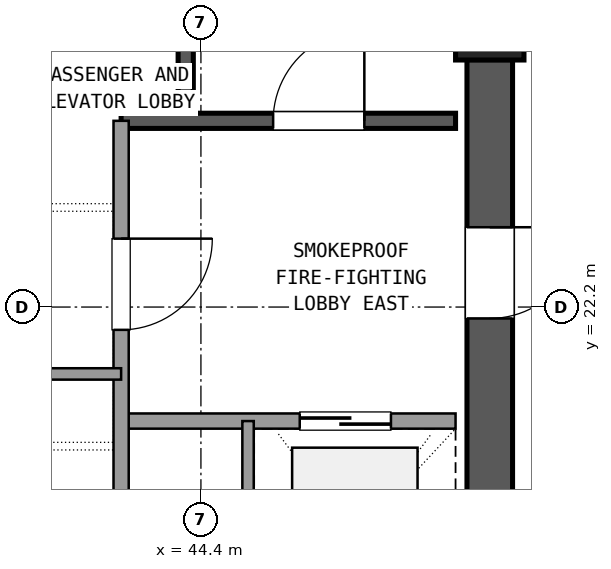
"""IFC4 building model, lengths in metres.
Left out: names, types, materials, properties, quantities, classifications, styles, units other than length and angle.
Written with IfcOpenShell. Run it as: python <this file> out.ifc"""

import sys

from ifc_helpers import new_model, si_unit, direction, frame, frame_2d, origin, origin_2d, place, context, subcontext, project, spatial, rectangle, extrude, element, fill, save


model = new_model("IFC4")
c1 = context("Model", 3, precision=1e-05, world=origin(), true_north=direction((0.0, 1.0)))
c2 = subcontext(c1, "Body", "Model", "MODEL_VIEW")
j1 = project(units=[si_unit("LENGTHUNIT", "METRE"), si_unit("PLANEANGLEUNIT", "RADIAN")], contexts=[c1])
p1 = place(None, origin())
s1 = spatial("IfcSite", under=j1, at=p1, CompositionType="ELEMENT")
p2 = place(p1, origin())
s2 = spatial("IfcBuilding", under=s1, at=p2, CompositionType="ELEMENT")
p3 = place(p2, frame((0.0, 0.0, 221.58)))
s3 = spatial("IfcBuildingStorey", under=s2, at=p3, CompositionType="ELEMENT", Elevation=221.58)
p4 = place(p3, frame((48.2, 25.9, 0.0), z_axis=(0.0, 0.0, 1.0), x_axis=(1.0, 0.0, 0.0)))
e1 = element("IfcColumn", 1, at=p4, inside=s3, PredefinedType="COLUMN", context=c2, shape_type="SweptSolid", body=[
    extrude(rectangle(XDim=0.9, YDim=0.9, at=origin_2d()), origin(), (0.0, 0.0, 1.0), 3.6),
])
p5 = place(p3, frame((48.2, 17.745, 0.0), z_axis=(0.0, 0.0, 1.0), x_axis=(0.0, 1.0, 0.0)))
e2 = element("IfcWall", 2, at=p5, inside=s3, PredefinedType="SHEAR", context=c2, shape_type="SweptSolid", body=[
    extrude(rectangle(XDim=7.71, YDim=0.6, at=frame_2d((3.855, 0.0))), origin(), (0.0, 0.0, 1.0), 3.32),
])
p6 = place(p5, frame((4.305, 0.0, 0.0)))
e3 = element("IfcOpeningElement", 3, at=p6, cuts=e2, PredefinedType="OPENING", context=c2, shape_type="SweptSolid", body=[
    extrude(rectangle(XDim=1.2, YDim=2.15, at=frame_2d((0.6, 1.075))), frame((0.0, 0.31, 0.0), z_axis=(0.0, -1.0, 0.0), x_axis=(1.0, 0.0, 0.0)), (0.0, 0.0, 1.0), 0.62),
])
p7 = place(p3, frame((44.2, 24.65, 0.0), z_axis=(0.0, 0.0, 1.0), x_axis=(0.0, 1.0, 0.0)))
e4 = element("IfcWall", 4, at=p7, inside=s3, PredefinedType="SHEAR", context=c2, shape_type="SweptSolid", body=[
    extrude(rectangle(XDim=9.4, YDim=0.2, at=frame_2d((4.7, 0.0))), origin(), (0.0, 0.0, 1.0), 3.32),
])
p8 = place(p3, frame((43.35, 24.65, 0.0), z_axis=(0.0, 0.0, 1.0), x_axis=(1.0, 0.0, 0.0)))
e5 = element("IfcWall", 5, at=p8, inside=s3, PredefinedType="SHEAR", context=c2, shape_type="SweptSolid", body=[
    extrude(rectangle(XDim=4.4, YDim=0.2, at=frame_2d((2.2, 0.0))), origin(), (0.0, 0.0, 1.0), 3.32),
])
p9 = place(p8, frame((2.0, 0.0, 0.0)))
e6 = element("IfcOpeningElement", 6, at=p9, cuts=e5, PredefinedType="OPENING", context=c2, shape_type="SweptSolid", body=[
    extrude(rectangle(XDim=1.2, YDim=2.15, at=frame_2d((0.6, 1.075))), frame((0.0, 0.11, 0.0), z_axis=(0.0, -1.0, 0.0), x_axis=(1.0, 0.0, 0.0)), (0.0, 0.0, 1.0), 0.22),
])
p10 = place(p3, frame((43.35, 20.7, 0.0), z_axis=(0.0, 0.0, 1.0), x_axis=(1.0, 0.0, 0.0)))
e7 = element("IfcWall", 7, at=p10, inside=s3, PredefinedType="SOLIDWALL", context=c2, shape_type="SweptSolid", body=[
    extrude(rectangle(XDim=4.4, YDim=0.2, at=frame_2d((2.2, 0.0))), origin(), (0.0, 0.0, 1.0), 2.61),
])
p11 = place(p10, frame((2.35, 0.0, 0.0)))
e8 = element("IfcOpeningElement", 8, at=p11, cuts=e7, PredefinedType="OPENING", context=c2, shape_type="SweptSolid", body=[
    extrude(rectangle(XDim=1.2, YDim=2.15, at=frame_2d((0.6, 1.075))), frame((0.0, 0.11, 0.0), z_axis=(0.0, -1.0, 0.0), x_axis=(1.0, 0.0, 0.0)), (0.0, 0.0, 1.0), 0.22),
])
p12 = place(p3, frame((43.35, 17.75, 0.0), z_axis=(0.0, 0.0, 1.0), x_axis=(0.0, 1.0, 0.0)))
e9 = element("IfcWall", 9, at=p12, inside=s3, PredefinedType="SOLIDWALL", context=c2, shape_type="SweptSolid", body=[
    extrude(rectangle(XDim=6.9, YDim=0.2, at=frame_2d((3.45, 0.0))), origin(), (0.0, 0.0, 1.0), 2.61),
])
p13 = place(p12, frame((4.15, 0.0, 0.0)))
e10 = element("IfcOpeningElement", 10, at=p13, cuts=e9, PredefinedType="OPENING", context=c2, shape_type="SweptSolid", body=[
    extrude(rectangle(XDim=1.2, YDim=2.15, at=frame_2d((0.6, 1.075))), frame((0.0, 0.11, 0.0), z_axis=(0.0, -1.0, 0.0), x_axis=(1.0, 0.0, 0.0)), (0.0, 0.0, 1.0), 0.22),
])
p14 = place(p3, frame((45.02, 17.75, 0.0), z_axis=(0.0, 0.0, 1.0), x_axis=(0.0, 1.0, 0.0)))
e11 = element("IfcWall", 11, at=p14, inside=s3, PredefinedType="PARTITIONING", context=c2, shape_type="SweptSolid", body=[
    extrude(rectangle(XDim=2.95, YDim=0.15, at=frame_2d((1.475, 0.0))), origin(), (0.0, 0.0, 1.0), 2.61),
])
p15 = place(p3, frame((37.25, 21.32, 0.0), z_axis=(0.0, 0.0, 1.0), x_axis=(1.0, 0.0, 0.0)))
e12 = element("IfcWall", 12, at=p15, inside=s3, PredefinedType="PARTITIONING", context=c2, shape_type="SweptSolid", body=[
    extrude(rectangle(XDim=6.1, YDim=0.15, at=frame_2d((3.05, 0.0))), origin(), (0.0, 0.0, 1.0), 2.61),
])
p16 = place(p15, frame((0.55, 0.0, 0.0)))
e13 = element("IfcOpeningElement", 13, at=p16, cuts=e12, PredefinedType="OPENING", context=c2, shape_type="SweptSolid", body=[
    extrude(rectangle(XDim=1.0, YDim=2.15, at=frame_2d((0.5, 1.075))), frame((0.0, 0.085, 0.0), z_axis=(0.0, -1.0, 0.0), x_axis=(1.0, 0.0, 0.0)), (0.0, 0.0, 1.0), 0.17),
])
p17 = place(p15, frame((3.15, 0.0, 0.0)))
e14 = element("IfcOpeningElement", 14, at=p17, cuts=e12, PredefinedType="OPENING", context=c2, shape_type="SweptSolid", body=[
    extrude(rectangle(XDim=1.0, YDim=2.15, at=frame_2d((0.5, 1.075))), frame((0.0, 0.085, 0.0), z_axis=(0.0, -1.0, 0.0), x_axis=(1.0, 0.0, 0.0)), (0.0, 0.0, 1.0), 0.17),
])
p18 = place(p9, origin())
e15 = element("IfcDoor", 15, at=p18, inside=s3, OperationType="SINGLE_SWING_RIGHT", PredefinedType="DOOR", context=c2, shape_type="SweptSolid", body=[
    extrude(rectangle(XDim=1.2, YDim=2.15, at=frame_2d((0.6, 1.075))), frame((0.0, 0.025, 0.0), z_axis=(0.0, -1.0, 0.0), x_axis=(1.0, 0.0, 0.0)), (0.0, 0.0, 1.0), 0.05),
])
fill(e6, e15)
p19 = place(p11, origin())
e16 = element("IfcDoor", 16, at=p19, inside=s3, OperationType="SLIDING_TO_RIGHT", PredefinedType="DOOR", context=c2, shape_type="SweptSolid", body=[
    extrude(rectangle(XDim=1.2, YDim=2.15, at=frame_2d((0.6, 1.075))), frame((0.0, 0.025, 0.0), z_axis=(0.0, -1.0, 0.0), x_axis=(1.0, 0.0, 0.0)), (0.0, 0.0, 1.0), 0.05),
])
fill(e8, e16)
p20 = place(p13, frame((1.2, 0.0, 0.0), z_axis=(0.0, 0.0, 1.0), x_axis=(-1.0, 0.0, 0.0)))
e17 = element("IfcDoor", 17, at=p20, inside=s3, OperationType="SINGLE_SWING_RIGHT", PredefinedType="DOOR", context=c2, shape_type="SweptSolid", body=[
    extrude(rectangle(XDim=1.2, YDim=2.15, at=frame_2d((0.6, 1.075))), frame((0.0, 0.025, 0.0), z_axis=(0.0, -1.0, 0.0), x_axis=(1.0, 0.0, 0.0)), (0.0, 0.0, 1.0), 0.05),
])
fill(e10, e17)
p21 = place(p6, frame((1.2, 0.0, 0.0), z_axis=(0.0, 0.0, 1.0), x_axis=(-1.0, 0.0, 0.0)))
e18 = element("IfcDoor", 18, at=p21, inside=s3, OperationType="SINGLE_SWING_RIGHT", PredefinedType="DOOR", context=c2, shape_type="SweptSolid", body=[
    extrude(rectangle(XDim=1.2, YDim=2.15, at=frame_2d((0.6, 1.075))), frame((0.0, 0.025, 0.0), z_axis=(0.0, -1.0, 0.0), x_axis=(1.0, 0.0, 0.0)), (0.0, 0.0, 1.0), 0.05),
])
fill(e3, e18)
save(model, sys.argv[1])
